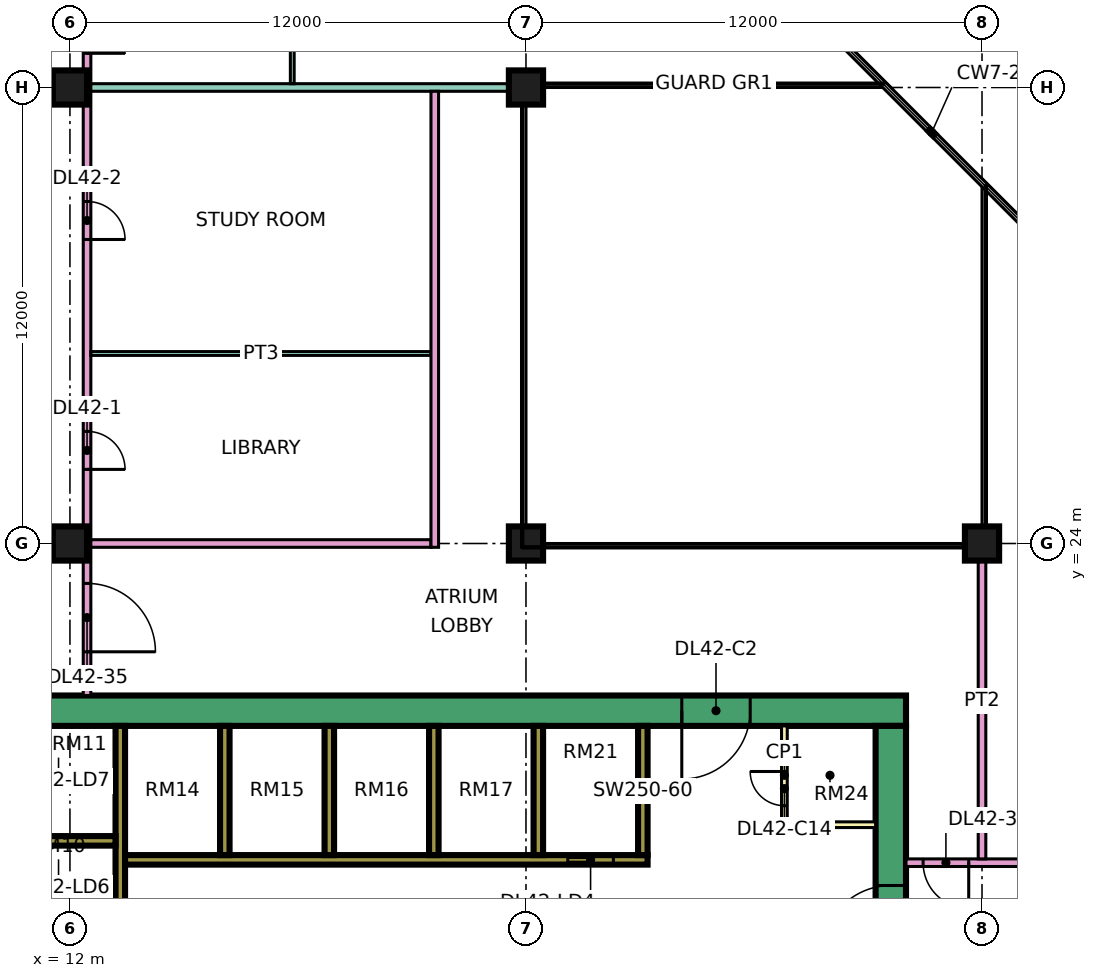
"""IFC4 building model, lengths in metres.
Left out: names, types, materials, properties, quantities, classifications, styles, units other than length and angle.
Written with IfcOpenShell. Run it as: python <this file> out.ifc"""

import sys

from ifc_helpers import new_model, si_unit, direction, frame, frame_2d, origin, origin_2d, place, context, subcontext, project, spatial, rectangle, extrude, element, fill, save


model = new_model("IFC4")
c1 = context("Model", 3, precision=1e-05, world=origin(), true_north=direction((0.0, 1.0)))
c2 = subcontext(c1, "Body", "Model", "MODEL_VIEW")
j1 = project(units=[si_unit("LENGTHUNIT", "METRE"), si_unit("PLANEANGLEUNIT", "RADIAN")], contexts=[c1])
p1 = place(None, origin())
s1 = spatial("IfcSite", under=j1, at=p1, CompositionType="ELEMENT")
p2 = place(p1, origin())
s2 = spatial("IfcBuilding", under=s1, at=p2, CompositionType="ELEMENT")
p3 = place(p2, frame((0.0, 0.0, 183.65)))
s3 = spatial("IfcBuildingStorey", under=s2, at=p3, CompositionType="ELEMENT", Elevation=183.65)
for number, where, z_axis, x_axis in (
    (1, (12.0, 24.0, 0.0), (0.0, 0.0, 1.0), (1.0, 0.0, 0.0)),
    (2, (12.0, 36.0, 0.0), (0.0, 0.0, 1.0), (1.0, 0.0, 0.0)),
    (3, (24.0, 24.0, 0.0), (0.0, 0.0, 1.0), (1.0, 0.0, 0.0)),
    (4, (24.0, 36.0, 0.0), (0.0, 0.0, 1.0), (1.0, 0.0, 0.0)),
    (5, (36.0, 24.0, 0.0), (0.0, 0.0, 1.0), (1.0, 0.0, 0.0)),
):
    element("IfcColumn", number, at=place(p3, frame(where, z_axis=z_axis, x_axis=x_axis)), inside=s3, PredefinedType="COLUMN", context=c2, shape_type="SweptSolid", body=[
        extrude(rectangle(XDim=0.9, YDim=0.9, at=origin_2d()), origin(), (0.0, 0.0, 1.0), 3.75),
    ])
p4 = place(p3, frame((9.0, 19.6, 0.0), z_axis=(0.0, 0.0, 1.0), x_axis=(1.0, 0.0, 0.0)))
e6 = element("IfcWall", 6, at=p4, inside=s3, PredefinedType="SHEAR", context=c2, shape_type="SweptSolid", body=[
    extrude(rectangle(XDim=25.0, YDim=0.8, at=frame_2d((12.5, 0.0))), origin(), (0.0, 0.0, 1.0), 3.75),
])
p5 = place(p4, frame((19.1, 0.0, 0.0)))
e7 = element("IfcOpeningElement", 7, at=p5, cuts=e6, PredefinedType="OPENING", context=c2, shape_type="SweptSolid", body=[
    extrude(rectangle(XDim=1.8, YDim=2.4, at=frame_2d((0.9, 1.2))), frame((0.0, 0.41, 0.0), z_axis=(0.0, -1.0, 0.0), x_axis=(1.0, 0.0, 0.0)), (0.0, 0.0, 1.0), 0.82),
])
p6 = place(p3, frame((33.6, 7.8, 0.0), z_axis=(0.0, 0.0, 1.0), x_axis=(0.0, 1.0, 0.0)))
e8 = element("IfcWall", 8, at=p6, inside=s3, PredefinedType="SHEAR", context=c2, shape_type="SweptSolid", body=[
    extrude(rectangle(XDim=11.4, YDim=0.8, at=frame_2d((5.7, 0.0))), origin(), (0.0, 0.0, 1.0), 3.75),
])
p7 = place(p6, frame((5.4, 0.0, 0.0)))
e9 = element("IfcOpeningElement", 9, at=p7, cuts=e8, PredefinedType="OPENING", context=c2, shape_type="SweptSolid", body=[
    extrude(rectangle(XDim=1.8, YDim=2.4, at=frame_2d((0.9, 1.2))), frame((0.0, 0.41, 0.0), z_axis=(0.0, -1.0, 0.0), x_axis=(1.0, 0.0, 0.0)), (0.0, 0.0, 1.0), 0.82),
])
p8 = place(p3, frame((13.325, 7.8, 0.0), z_axis=(0.0, 0.0, 1.0), x_axis=(0.0, 1.0, 0.0)))
e10 = element("IfcWall", 10, at=p8, inside=s3, PredefinedType="SHEAR", context=c2, shape_type="SweptSolid", body=[
    extrude(rectangle(XDim=11.4, YDim=0.25, at=frame_2d((5.7, 0.0))), origin(), (0.0, 0.0, 1.0), 3.75),
])
p9 = place(p3, frame((13.45, 15.675, 0.0), z_axis=(0.0, 0.0, 1.0), x_axis=(1.0, 0.0, 0.0)))
e11 = element("IfcWall", 11, at=p9, inside=s3, PredefinedType="SHEAR", context=c2, shape_type="SweptSolid", body=[
    extrude(rectangle(XDim=13.75, YDim=0.25, at=frame_2d((6.875, 0.0))), origin(), (0.0, 0.0, 1.0), 3.75),
])
p10 = place(p9, frame((11.65, 0.0, 0.0)))
e12 = element("IfcOpeningElement", 12, at=p10, cuts=e11, PredefinedType="OPENING", context=c2, shape_type="SweptSolid", body=[
    extrude(rectangle(XDim=1.2, YDim=2.2, at=frame_2d((0.6, 1.1))), frame((0.0, 0.135, 0.0), z_axis=(0.0, -1.0, 0.0), x_axis=(1.0, 0.0, 0.0)), (0.0, 0.0, 1.0), 0.27),
])
p11 = place(p3, frame((10.2, 16.175, 0.0), z_axis=(0.0, 0.0, 1.0), x_axis=(1.0, 0.0, 0.0)))
e13 = element("IfcWall", 13, at=p11, inside=s3, PredefinedType="SHEAR", context=c2, shape_type="SweptSolid", body=[
    extrude(rectangle(XDim=3.0, YDim=0.25, at=frame_2d((1.5, 0.0))), origin(), (0.0, 0.0, 1.0), 3.75),
])
for number, where, z_axis, x_axis in (
    (14, (16.075, 15.8, 0.0), (0.0, 0.0, 1.0), (0.0, 1.0, 0.0)),
    (15, (18.825, 15.8, 0.0), (0.0, 0.0, 1.0), (0.0, 1.0, 0.0)),
    (16, (21.575, 15.8, 0.0), (0.0, 0.0, 1.0), (0.0, 1.0, 0.0)),
    (17, (24.325, 15.8, 0.0), (0.0, 0.0, 1.0), (0.0, 1.0, 0.0)),
    (18, (27.075, 15.8, 0.0), (0.0, 0.0, 1.0), (0.0, 1.0, 0.0)),
):
    element("IfcWall", number, at=place(p3, frame(where, z_axis=z_axis, x_axis=x_axis)), inside=s3, PredefinedType="SHEAR", context=c2, shape_type="SweptSolid", body=[
        extrude(rectangle(XDim=3.4, YDim=0.25, at=frame_2d((1.7, 0.0))), origin(), (0.0, 0.0, 1.0), 3.75),
    ])
p12 = place(p3, frame((30.8, 16.6, 0.0), z_axis=(0.0, 0.0, 1.0), x_axis=(0.0, 1.0, 0.0)))
e19 = element("IfcWall", 19, at=p12, inside=s3, PredefinedType="PARTITIONING", context=c2, shape_type="SweptSolid", body=[
    extrude(rectangle(XDim=2.6, YDim=0.15, at=frame_2d((1.3, 0.0))), origin(), (0.0, 0.0, 1.0), 3.35),
])
p13 = place(p12, frame((0.5, 0.0, 0.0)))
e20 = element("IfcOpeningElement", 20, at=p13, cuts=e19, PredefinedType="OPENING", context=c2, shape_type="SweptSolid", body=[
    extrude(rectangle(XDim=0.9, YDim=2.1, at=frame_2d((0.45, 1.05))), frame((0.0, 0.085, 0.0), z_axis=(0.0, -1.0, 0.0), x_axis=(1.0, 0.0, 0.0)), (0.0, 0.0, 1.0), 0.17),
])
p14 = place(p3, frame((30.8, 16.6, 0.0), z_axis=(0.0, 0.0, 1.0), x_axis=(1.0, 0.0, 0.0)))
e21 = element("IfcWall", 21, at=p14, inside=s3, PredefinedType="PARTITIONING", context=c2, shape_type="SweptSolid", body=[
    extrude(rectangle(XDim=2.4, YDim=0.15, at=frame_2d((1.2, 0.0))), origin(), (0.0, 0.0, 1.0), 3.35),
])
p15 = place(p3, frame((12.45, 20.0, 0.0), z_axis=(0.0, 0.0, 1.0), x_axis=(0.0, 1.0, 0.0)))
e22 = element("IfcWall", 22, at=p15, inside=s3, PredefinedType="PARTITIONING", context=c2, shape_type="SweptSolid", body=[
    extrude(rectangle(XDim=42.926, YDim=0.2, at=frame_2d((21.463, 0.0))), origin(), (0.0, 0.0, 1.0), 3.35),
])
p16 = place(p15, frame((5.95, 0.0, 0.0)))
e23 = element("IfcOpeningElement", 23, at=p16, cuts=e22, PredefinedType="OPENING", context=c2, shape_type="SweptSolid", body=[
    extrude(rectangle(XDim=1.0, YDim=2.1, at=frame_2d((0.5, 1.05))), frame((0.0, 0.11, 0.0), z_axis=(0.0, -1.0, 0.0), x_axis=(1.0, 0.0, 0.0)), (0.0, 0.0, 1.0), 0.22),
])
p17 = place(p15, frame((12.0, 0.0, 0.0)))
e24 = element("IfcOpeningElement", 24, at=p17, cuts=e22, PredefinedType="OPENING", context=c2, shape_type="SweptSolid", body=[
    extrude(rectangle(XDim=1.0, YDim=2.1, at=frame_2d((0.5, 1.05))), frame((0.0, 0.11, 0.0), z_axis=(0.0, -1.0, 0.0), x_axis=(1.0, 0.0, 0.0)), (0.0, 0.0, 1.0), 0.22),
])
p18 = place(p15, frame((16.9, 0.0, 0.0)))
e25 = element("IfcOpeningElement", 25, at=p18, cuts=e22, PredefinedType="OPENING", context=c2, shape_type="SweptSolid", body=[
    extrude(rectangle(XDim=1.0, YDim=2.1, at=frame_2d((0.5, 1.05))), frame((0.0, 0.11, 0.0), z_axis=(0.0, -1.0, 0.0), x_axis=(1.0, 0.0, 0.0)), (0.0, 0.0, 1.0), 0.22),
])
p19 = place(p15, frame((34.9, 0.0, 0.0)))
e26 = element("IfcOpeningElement", 26, at=p19, cuts=e22, PredefinedType="OPENING", context=c2, shape_type="SweptSolid", body=[
    extrude(rectangle(XDim=1.0, YDim=2.1, at=frame_2d((0.5, 1.05))), frame((0.0, 0.11, 0.0), z_axis=(0.0, -1.0, 0.0), x_axis=(1.0, 0.0, 0.0)), (0.0, 0.0, 1.0), 0.22),
])
p20 = place(p15, frame((1.15, 0.0, 0.0)))
e27 = element("IfcOpeningElement", 27, at=p20, cuts=e22, PredefinedType="OPENING", context=c2, shape_type="SweptSolid", body=[
    extrude(rectangle(XDim=1.8, YDim=2.1, at=frame_2d((0.9, 1.05))), frame((0.0, 0.11, 0.0), z_axis=(0.0, -1.0, 0.0), x_axis=(1.0, 0.0, 0.0)), (0.0, 0.0, 1.0), 0.22),
])
p21 = place(p15, frame((28.6, 0.0, 0.0)))
e28 = element("IfcOpeningElement", 28, at=p21, cuts=e22, PredefinedType="OPENING", context=c2, shape_type="SweptSolid", body=[
    extrude(rectangle(XDim=1.8, YDim=2.1, at=frame_2d((0.9, 1.05))), frame((0.0, 0.11, 0.0), z_axis=(0.0, -1.0, 0.0), x_axis=(1.0, 0.0, 0.0)), (0.0, 0.0, 1.0), 0.22),
])
p22 = place(p3, frame((12.55, 24.0, 0.0), z_axis=(0.0, 0.0, 1.0), x_axis=(1.0, 0.0, 0.0)))
e29 = element("IfcWall", 29, at=p22, inside=s3, PredefinedType="PARTITIONING", context=c2, shape_type="SweptSolid", body=[
    extrude(rectangle(XDim=8.95, YDim=0.2, at=frame_2d((4.475, 0.0))), origin(), (0.0, 0.0, 1.0), 3.35),
])
p23 = place(p3, frame((12.55, 29.0, 0.0), z_axis=(0.0, 0.0, 1.0), x_axis=(1.0, 0.0, 0.0)))
e30 = element("IfcWall", 30, at=p23, inside=s3, PredefinedType="PARTITIONING", context=c2, shape_type="SweptSolid", body=[
    extrude(rectangle(XDim=8.95, YDim=0.1, at=frame_2d((4.475, 0.0))), origin(), (0.0, 0.0, 1.0), 3.35),
])
p24 = place(p3, frame((12.55, 36.0, 0.0), z_axis=(0.0, 0.0, 1.0), x_axis=(1.0, 0.0, 0.0)))
e31 = element("IfcWall", 31, at=p24, inside=s3, PredefinedType="PARTITIONING", context=c2, shape_type="SweptSolid", body=[
    extrude(rectangle(XDim=11.45, YDim=0.2, at=frame_2d((5.725, 0.0))), origin(), (0.0, 0.0, 1.0), 3.35),
])
p25 = place(p3, frame((17.85, 36.1, 0.0), z_axis=(0.0, 0.0, 1.0), x_axis=(0.0, 1.0, 0.0)))
e32 = element("IfcWall", 32, at=p25, inside=s3, PredefinedType="PARTITIONING", context=c2, shape_type="SweptSolid", body=[
    extrude(rectangle(XDim=2.85, YDim=0.1, at=frame_2d((1.425, 0.0))), origin(), (0.0, 0.0, 1.0), 3.35),
])
p26 = place(p25, frame((0.95, 0.0, 0.0)))
e33 = element("IfcOpeningElement", 33, at=p26, cuts=e32, PredefinedType="OPENING", context=c2, shape_type="SweptSolid", body=[
    extrude(rectangle(XDim=0.9, YDim=2.1, at=frame_2d((0.45, 1.05))), frame((0.0, 0.06, 0.0), z_axis=(0.0, -1.0, 0.0), x_axis=(1.0, 0.0, 0.0)), (0.0, 0.0, 1.0), 0.12),
])
p27 = place(p3, frame((21.6, 23.9, 0.0), z_axis=(0.0, 0.0, 1.0), x_axis=(0.0, 1.0, 0.0)))
e34 = element("IfcWall", 34, at=p27, inside=s3, PredefinedType="PARTITIONING", context=c2, shape_type="SweptSolid", body=[
    extrude(rectangle(XDim=12.0, YDim=0.2, at=frame_2d((6.0, 0.0))), origin(), (0.0, 0.0, 1.0), 3.35),
])
p28 = place(p3, frame((34.0, 15.6, 0.0), z_axis=(0.0, 0.0, 1.0), x_axis=(1.0, 0.0, 0.0)))
e35 = element("IfcWall", 35, at=p28, inside=s3, PredefinedType="PARTITIONING", context=c2, shape_type="SweptSolid", body=[
    extrude(rectangle(XDim=10.35, YDim=0.2, at=frame_2d((5.175, 0.0))), origin(), (0.0, 0.0, 1.0), 3.35),
])
p29 = place(p28, frame((5.6, 0.0, 0.0)))
e36 = element("IfcOpeningElement", 36, at=p29, cuts=e35, PredefinedType="OPENING", context=c2, shape_type="SweptSolid", body=[
    extrude(rectangle(XDim=1.0, YDim=2.1, at=frame_2d((0.5, 1.05))), frame((0.0, 0.11, 0.0), z_axis=(0.0, -1.0, 0.0), x_axis=(1.0, 0.0, 0.0)), (0.0, 0.0, 1.0), 0.22),
])
p30 = place(p28, frame((0.45, 0.0, 0.0)))
e37 = element("IfcOpeningElement", 37, at=p30, cuts=e35, PredefinedType="OPENING", context=c2, shape_type="SweptSolid", body=[
    extrude(rectangle(XDim=1.2, YDim=2.1, at=frame_2d((0.6, 1.05))), frame((0.0, 0.11, 0.0), z_axis=(0.0, -1.0, 0.0), x_axis=(1.0, 0.0, 0.0)), (0.0, 0.0, 1.0), 0.22),
])
p31 = place(p3, frame((36.0, 15.7, 0.0), z_axis=(0.0, 0.0, 1.0), x_axis=(0.0, 1.0, 0.0)))
e38 = element("IfcWall", 38, at=p31, inside=s3, PredefinedType="PARTITIONING", context=c2, shape_type="SweptSolid", body=[
    extrude(rectangle(XDim=8.3, YDim=0.2, at=frame_2d((4.15, 0.0))), origin(), (0.0, 0.0, 1.0), 3.35),
])
p32 = place(p10, origin())
e39 = element("IfcDoor", 39, at=p32, inside=s3, OperationType="DOUBLE_DOOR_SLIDING", PredefinedType="DOOR", context=c2, shape_type="SweptSolid", body=[
    extrude(rectangle(XDim=1.2, YDim=2.2, at=frame_2d((0.6, 1.1))), frame((0.0, 0.025, 0.0), z_axis=(0.0, -1.0, 0.0), x_axis=(1.0, 0.0, 0.0)), (0.0, 0.0, 1.0), 0.05),
])
fill(e12, e39)
p33 = place(p7, origin())
e40 = element("IfcDoor", 40, at=p33, inside=s3, OperationType="DOUBLE_DOOR_SINGLE_SWING", PredefinedType="DOOR", context=c2, shape_type="SweptSolid", body=[
    extrude(rectangle(XDim=1.8, YDim=2.4, at=frame_2d((0.9, 1.2))), frame((0.0, 0.025, 0.0), z_axis=(0.0, -1.0, 0.0), x_axis=(1.0, 0.0, 0.0)), (0.0, 0.0, 1.0), 0.05),
])
fill(e9, e40)
p34 = place(p5, frame((1.8, 0.0, 0.0), z_axis=(0.0, 0.0, 1.0), x_axis=(-1.0, 0.0, 0.0)))
e41 = element("IfcDoor", 41, at=p34, inside=s3, OperationType="DOUBLE_DOOR_SINGLE_SWING", PredefinedType="DOOR", context=c2, shape_type="SweptSolid", body=[
    extrude(rectangle(XDim=1.8, YDim=2.4, at=frame_2d((0.9, 1.2))), frame((0.0, 0.025, 0.0), z_axis=(0.0, -1.0, 0.0), x_axis=(1.0, 0.0, 0.0)), (0.0, 0.0, 1.0), 0.05),
])
fill(e7, e41)
p35 = place(p13, frame((0.9, 0.0, 0.0), z_axis=(0.0, 0.0, 1.0), x_axis=(-1.0, 0.0, 0.0)))
e42 = element("IfcDoor", 42, at=p35, inside=s3, OperationType="SINGLE_SWING_RIGHT", PredefinedType="DOOR", context=c2, shape_type="SweptSolid", body=[
    extrude(rectangle(XDim=0.9, YDim=2.1, at=frame_2d((0.45, 1.05))), frame((0.0, 0.025, 0.0), z_axis=(0.0, -1.0, 0.0), x_axis=(1.0, 0.0, 0.0)), (0.0, 0.0, 1.0), 0.05),
])
fill(e20, e42)
p36 = place(p16, frame((1.0, 0.0, 0.0), z_axis=(0.0, 0.0, 1.0), x_axis=(-1.0, 0.0, 0.0)))
e43 = element("IfcDoor", 43, at=p36, inside=s3, OperationType="SINGLE_SWING_LEFT", PredefinedType="DOOR", context=c2, shape_type="SweptSolid", body=[
    extrude(rectangle(XDim=1.0, YDim=2.1, at=frame_2d((0.5, 1.05))), frame((0.0, 0.025, 0.0), z_axis=(0.0, -1.0, 0.0), x_axis=(1.0, 0.0, 0.0)), (0.0, 0.0, 1.0), 0.05),
])
fill(e23, e43)
p37 = place(p17, frame((1.0, 0.0, 0.0), z_axis=(0.0, 0.0, 1.0), x_axis=(-1.0, 0.0, 0.0)))
e44 = element("IfcDoor", 44, at=p37, inside=s3, OperationType="SINGLE_SWING_LEFT", PredefinedType="DOOR", context=c2, shape_type="SweptSolid", body=[
    extrude(rectangle(XDim=1.0, YDim=2.1, at=frame_2d((0.5, 1.05))), frame((0.0, 0.025, 0.0), z_axis=(0.0, -1.0, 0.0), x_axis=(1.0, 0.0, 0.0)), (0.0, 0.0, 1.0), 0.05),
])
fill(e24, e44)
p38 = place(p18, frame((1.0, 0.0, 0.0), z_axis=(0.0, 0.0, 1.0), x_axis=(-1.0, 0.0, 0.0)))
e45 = element("IfcDoor", 45, at=p38, inside=s3, OperationType="SINGLE_SWING_LEFT", PredefinedType="DOOR", context=c2, shape_type="SweptSolid", body=[
    extrude(rectangle(XDim=1.0, YDim=2.1, at=frame_2d((0.5, 1.05))), frame((0.0, 0.025, 0.0), z_axis=(0.0, -1.0, 0.0), x_axis=(1.0, 0.0, 0.0)), (0.0, 0.0, 1.0), 0.05),
])
fill(e25, e45)
p39 = place(p30, origin())
e46 = element("IfcDoor", 46, at=p39, inside=s3, OperationType="SINGLE_SWING_RIGHT", PredefinedType="DOOR", context=c2, shape_type="SweptSolid", body=[
    extrude(rectangle(XDim=1.2, YDim=2.1, at=frame_2d((0.6, 1.05))), frame((0.0, 0.025, 0.0), z_axis=(0.0, -1.0, 0.0), x_axis=(1.0, 0.0, 0.0)), (0.0, 0.0, 1.0), 0.05),
])
fill(e37, e46)
p40 = place(p20, frame((1.8, 0.0, 0.0), z_axis=(0.0, 0.0, 1.0), x_axis=(-1.0, 0.0, 0.0)))
e47 = element("IfcDoor", 47, at=p40, inside=s3, OperationType="DOUBLE_DOOR_SINGLE_SWING", PredefinedType="DOOR", context=c2, shape_type="SweptSolid", body=[
    extrude(rectangle(XDim=1.8, YDim=2.1, at=frame_2d((0.9, 1.05))), frame((0.0, 0.025, 0.0), z_axis=(0.0, -1.0, 0.0), x_axis=(1.0, 0.0, 0.0)), (0.0, 0.0, 1.0), 0.05),
])
fill(e27, e47)
save(model, sys.argv[1])
